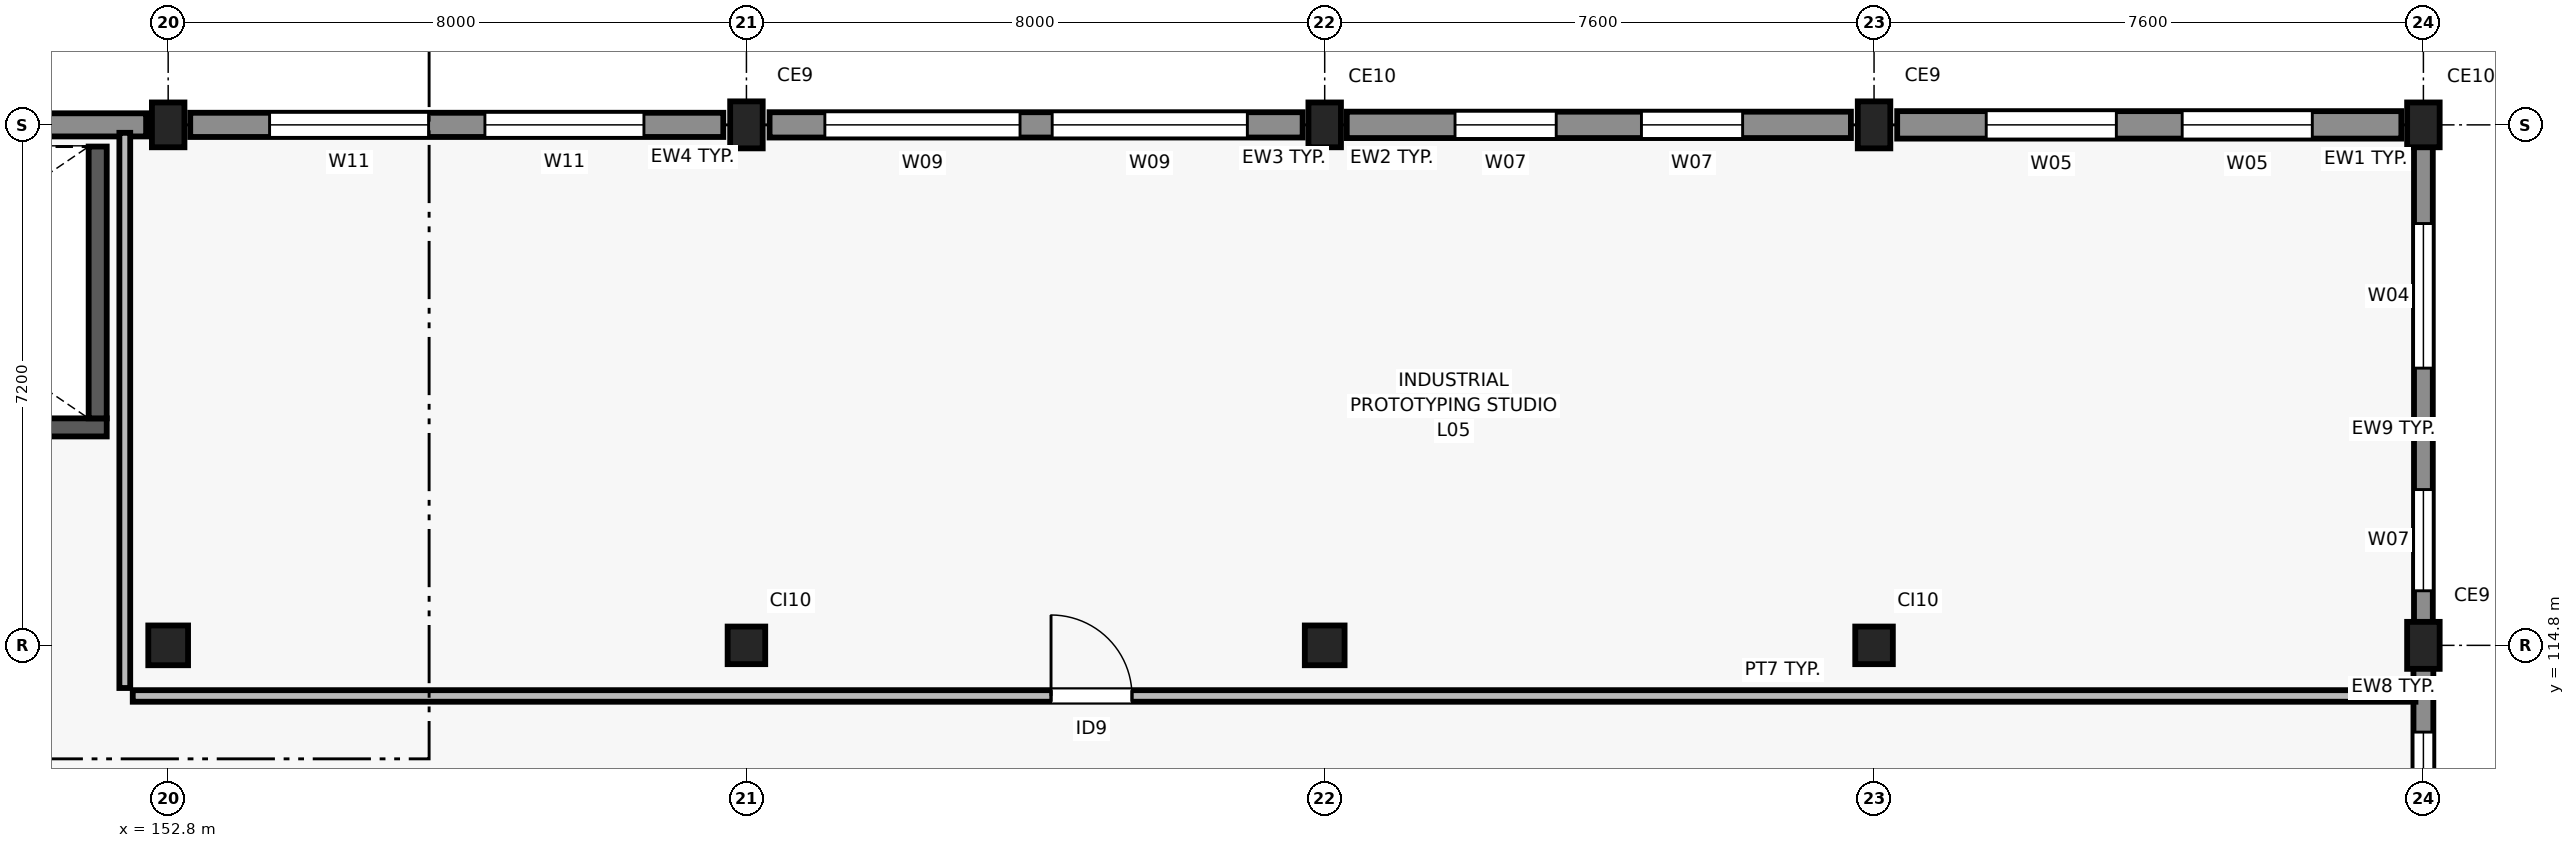
"""IFC4 building model, lengths in metres.
Left out: names, types, materials, properties, quantities, classifications, styles, units other than length and angle.
Written with IfcOpenShell. Run it as: python <this file> out.ifc"""

import sys

from ifc_helpers import new_model, si_unit, direction, frame, frame_2d, origin, origin_2d, place, context, subcontext, project, spatial, rectangle, extrude, element, fill, save


model = new_model("IFC4")
c1 = context("Model", 3, precision=1e-05, world=origin(), true_north=direction((0.0, 1.0)))
c2 = subcontext(c1, "Body", "Model", "MODEL_VIEW")
j1 = project(units=[si_unit("LENGTHUNIT", "METRE"), si_unit("PLANEANGLEUNIT", "RADIAN")], contexts=[c1])
p1 = place(None, origin())
s1 = spatial("IfcSite", under=j1, at=p1, CompositionType="ELEMENT")
p2 = place(p1, origin())
s2 = spatial("IfcBuilding", under=s1, at=p2, CompositionType="ELEMENT")
p3 = place(p2, frame((0.0, 0.0, 21.6)))
s3 = spatial("IfcBuildingStorey", under=s2, at=p3, CompositionType="ELEMENT", Elevation=21.6)
p4 = place(p3, frame((152.8, 114.8, 0.0), z_axis=(0.0, 0.0, 1.0), x_axis=(1.0, 0.0, 0.0)))
e1 = element("IfcColumn", 1, at=p4, inside=s3, PredefinedType="COLUMN", context=c2, shape_type="SweptSolid", body=[
    extrude(rectangle(XDim=0.55, YDim=0.55, at=origin_2d()), origin(), (0.0, 0.0, 1.0), 4.2),
])
p5 = place(p3, frame((152.8, 122.0, 0.0), z_axis=(0.0, 0.0, 1.0), x_axis=(1.0, 0.0, 0.0)))
e2 = element("IfcColumn", 2, at=p5, inside=s3, PredefinedType="COLUMN", context=c2, shape_type="SweptSolid", body=[
    extrude(rectangle(XDim=0.62, YDim=0.45, at=origin_2d()), origin(), (0.0, 0.0, 1.0), 4.2),
])
p6 = place(p3, frame((160.8, 114.8, 0.0), z_axis=(0.0, 0.0, 1.0), x_axis=(1.0, 0.0, 0.0)))
e3 = element("IfcColumn", 3, at=p6, inside=s3, PredefinedType="COLUMN", context=c2, shape_type="SweptSolid", body=[
    extrude(rectangle(XDim=0.52, YDim=0.52, at=origin_2d()), origin(), (0.0, 0.0, 1.0), 4.2),
])
p7 = place(p3, frame((160.8, 122.0, 0.0), z_axis=(0.0, 0.0, 1.0), x_axis=(1.0, 0.0, 0.0)))
e4 = element("IfcColumn", 4, at=p7, inside=s3, PredefinedType="COLUMN", context=c2, shape_type="SweptSolid", body=[
    extrude(rectangle(XDim=0.65, YDim=0.45, at=origin_2d()), origin(), (0.0, 0.0, 1.0), 4.2),
])
p8 = place(p3, frame((168.8, 114.8, 0.0), z_axis=(0.0, 0.0, 1.0), x_axis=(1.0, 0.0, 0.0)))
e5 = element("IfcColumn", 5, at=p8, inside=s3, PredefinedType="COLUMN", context=c2, shape_type="SweptSolid", body=[
    extrude(rectangle(XDim=0.55, YDim=0.55, at=origin_2d()), origin(), (0.0, 0.0, 1.0), 4.2),
])
p9 = place(p3, frame((168.8, 122.0, 0.0), z_axis=(0.0, 0.0, 1.0), x_axis=(1.0, 0.0, 0.0)))
e6 = element("IfcColumn", 6, at=p9, inside=s3, PredefinedType="COLUMN", context=c2, shape_type="SweptSolid", body=[
    extrude(rectangle(XDim=0.62, YDim=0.45, at=origin_2d()), origin(), (0.0, 0.0, 1.0), 4.2),
])
p10 = place(p3, frame((176.4, 114.8, 0.0), z_axis=(0.0, 0.0, 1.0), x_axis=(1.0, 0.0, 0.0)))
e7 = element("IfcColumn", 7, at=p10, inside=s3, PredefinedType="COLUMN", context=c2, shape_type="SweptSolid", body=[
    extrude(rectangle(XDim=0.52, YDim=0.52, at=origin_2d()), origin(), (0.0, 0.0, 1.0), 4.2),
])
for number, where, z_axis, x_axis in (
    (8, (176.4, 122.0, 0.0), (0.0, 0.0, 1.0), (1.0, 0.0, 0.0)),
    (9, (184.0, 114.8, 0.0), (0.0, 0.0, 1.0), (1.0, 0.0, 0.0)),
):
    element("IfcColumn", number, at=place(p3, frame(where, z_axis=z_axis, x_axis=x_axis)), inside=s3, PredefinedType="COLUMN", context=c2, shape_type="SweptSolid", body=[
        extrude(rectangle(XDim=0.65, YDim=0.45, at=origin_2d()), origin(), (0.0, 0.0, 1.0), 4.2),
    ])
p11 = place(p3, frame((184.0, 122.0, 0.0), z_axis=(0.0, 0.0, 1.0), x_axis=(1.0, 0.0, 0.0)))
e10 = element("IfcColumn", 10, at=p11, inside=s3, PredefinedType="COLUMN", context=c2, shape_type="SweptSolid", body=[
    extrude(rectangle(XDim=0.62, YDim=0.45, at=origin_2d()), origin(), (0.0, 0.0, 1.0), 4.2),
])
p12 = place(p3, frame((184.0, 107.82, 0.0), z_axis=(0.0, 0.0, 1.0), x_axis=(0.0, 1.0, 0.0)))
e11 = element("IfcWall", 11, at=p12, inside=s3, PredefinedType="SOLIDWALL", context=c2, shape_type="SweptSolid", body=[
    extrude(rectangle(XDim=6.76, YDim=0.275, at=frame_2d((3.38, 0.0))), origin(), (0.0, 0.0, 1.0), 3.52),
])
p13 = place(p12, frame((0.39, 0.0, 0.9)))
e12 = element("IfcOpeningElement", 12, at=p13, cuts=e11, PredefinedType="OPENING", context=c2, shape_type="SweptSolid", body=[
    extrude(rectangle(XDim=2.7, YDim=1.8, at=frame_2d((1.35, 0.9))), frame((0.0, 0.147, 0.0), z_axis=(0.0, -1.0, 0.0), x_axis=(1.0, 0.0, 0.0)), (0.0, 0.0, 1.0), 0.295),
])
p14 = place(p12, frame((3.98, 0.0, 0.9)))
e13 = element("IfcOpeningElement", 13, at=p14, cuts=e11, PredefinedType="OPENING", context=c2, shape_type="SweptSolid", body=[
    extrude(rectangle(XDim=1.8, YDim=1.8, at=frame_2d((0.9, 0.9))), frame((0.0, 0.147, 0.0), z_axis=(0.0, -1.0, 0.0), x_axis=(1.0, 0.0, 0.0)), (0.0, 0.0, 1.0), 0.295),
])
p15 = place(p3, frame((184.0, 115.02, 0.0), z_axis=(0.0, 0.0, 1.0), x_axis=(0.0, 1.0, 0.0)))
e14 = element("IfcWall", 14, at=p15, inside=s3, PredefinedType="SOLIDWALL", context=c2, shape_type="SweptSolid", body=[
    extrude(rectangle(XDim=6.76, YDim=0.26, at=frame_2d((3.38, 0.0))), origin(), (0.0, 0.0, 1.0), 3.54),
])
p16 = place(p15, frame((0.535, 0.0, 0.9)))
e15 = element("IfcOpeningElement", 15, at=p16, cuts=e14, PredefinedType="OPENING", context=c2, shape_type="SweptSolid", body=[
    extrude(rectangle(XDim=1.4, YDim=1.8, at=frame_2d((0.7, 0.9))), frame((0.0, 0.14, 0.0), z_axis=(0.0, -1.0, 0.0), x_axis=(1.0, 0.0, 0.0)), (0.0, 0.0, 1.0), 0.28),
])
p17 = place(p15, frame((3.615, 0.0, 0.9)))
e16 = element("IfcOpeningElement", 16, at=p17, cuts=e14, PredefinedType="OPENING", context=c2, shape_type="SweptSolid", body=[
    extrude(rectangle(XDim=2.0, YDim=1.8, at=frame_2d((1.0, 0.9))), frame((0.0, 0.14, 0.0), z_axis=(0.0, -1.0, 0.0), x_axis=(1.0, 0.0, 0.0)), (0.0, 0.0, 1.0), 0.28),
])
p18 = place(p3, frame((183.695, 122.0, 0.0), z_axis=(0.0, 0.0, 1.0), x_axis=(-1.0, 0.0, 0.0)))
e17 = element("IfcWall", 17, at=p18, inside=s3, PredefinedType="SOLIDWALL", context=c2, shape_type="SweptSolid", body=[
    extrude(rectangle(XDim=6.975, YDim=0.38, at=frame_2d((3.488, 0.0))), origin(), (0.0, 0.0, 1.0), 3.43),
])
p19 = place(p18, frame((1.232, 0.0, 0.9)))
e18 = element("IfcOpeningElement", 18, at=p19, cuts=e17, PredefinedType="OPENING", context=c2, shape_type="SweptSolid", body=[
    extrude(rectangle(XDim=1.8, YDim=1.8, at=frame_2d((0.9, 0.9))), frame((0.0, 0.2, 0.0), z_axis=(0.0, -1.0, 0.0), x_axis=(1.0, 0.0, 0.0)), (0.0, 0.0, 1.0), 0.4),
])
p20 = place(p18, frame((3.943, 0.0, 0.9)))
e19 = element("IfcOpeningElement", 19, at=p20, cuts=e17, PredefinedType="OPENING", context=c2, shape_type="SweptSolid", body=[
    extrude(rectangle(XDim=1.8, YDim=1.8, at=frame_2d((0.9, 0.9))), frame((0.0, 0.2, 0.0), z_axis=(0.0, -1.0, 0.0), x_axis=(1.0, 0.0, 0.0)), (0.0, 0.0, 1.0), 0.4),
])
p21 = place(p3, frame((176.08, 122.0, 0.0), z_axis=(0.0, 0.0, 1.0), x_axis=(-1.0, 0.0, 0.0)))
e20 = element("IfcWall", 20, at=p21, inside=s3, PredefinedType="SOLIDWALL", context=c2, shape_type="SweptSolid", body=[
    extrude(rectangle(XDim=6.975, YDim=0.365, at=frame_2d((3.488, 0.0))), origin(), (0.0, 0.0, 1.0), 3.43),
])
p22 = place(p21, frame((1.498, 0.0, 0.9)))
e21 = element("IfcOpeningElement", 21, at=p22, cuts=e20, PredefinedType="OPENING", context=c2, shape_type="SweptSolid", body=[
    extrude(rectangle(XDim=1.4, YDim=1.8, at=frame_2d((0.7, 0.9))), frame((0.0, 0.192, 0.0), z_axis=(0.0, -1.0, 0.0), x_axis=(1.0, 0.0, 0.0)), (0.0, 0.0, 1.0), 0.385),
])
p23 = place(p21, frame((4.077, 0.0, 0.9)))
e22 = element("IfcOpeningElement", 22, at=p23, cuts=e20, PredefinedType="OPENING", context=c2, shape_type="SweptSolid", body=[
    extrude(rectangle(XDim=1.4, YDim=1.8, at=frame_2d((0.7, 0.9))), frame((0.0, 0.192, 0.0), z_axis=(0.0, -1.0, 0.0), x_axis=(1.0, 0.0, 0.0)), (0.0, 0.0, 1.0), 0.385),
])
p24 = place(p3, frame((168.495, 122.0, 0.0), z_axis=(0.0, 0.0, 1.0), x_axis=(-1.0, 0.0, 0.0)))
e23 = element("IfcWall", 23, at=p24, inside=s3, PredefinedType="SOLIDWALL", context=c2, shape_type="SweptSolid", body=[
    extrude(rectangle(XDim=7.375, YDim=0.35, at=frame_2d((3.688, 0.0))), origin(), (0.0, 0.0, 1.0), 3.33),
])
p25 = place(p24, frame((0.765, 0.0, 0.9)))
e24 = element("IfcOpeningElement", 24, at=p25, cuts=e23, PredefinedType="OPENING", context=c2, shape_type="SweptSolid", body=[
    extrude(rectangle(XDim=2.7, YDim=1.5, at=frame_2d((1.35, 0.75))), frame((0.0, 0.185, 0.0), z_axis=(0.0, -1.0, 0.0), x_axis=(1.0, 0.0, 0.0)), (0.0, 0.0, 1.0), 0.37),
])
p26 = place(p24, frame((3.91, 0.0, 0.9)))
e25 = element("IfcOpeningElement", 25, at=p26, cuts=e23, PredefinedType="OPENING", context=c2, shape_type="SweptSolid", body=[
    extrude(rectangle(XDim=2.7, YDim=1.5, at=frame_2d((1.35, 0.75))), frame((0.0, 0.185, 0.0), z_axis=(0.0, -1.0, 0.0), x_axis=(1.0, 0.0, 0.0)), (0.0, 0.0, 1.0), 0.37),
])
p27 = place(p3, frame((160.48, 122.0, 0.0), z_axis=(0.0, 0.0, 1.0), x_axis=(-1.0, 0.0, 0.0)))
e26 = element("IfcWall", 26, at=p27, inside=s3, PredefinedType="SOLIDWALL", context=c2, shape_type="SweptSolid", body=[
    extrude(rectangle(XDim=7.375, YDim=0.335, at=frame_2d((3.688, 0.0))), origin(), (0.0, 0.0, 1.0), 3.43),
])
p28 = place(p27, frame((1.098, 0.0, 0.9)))
e27 = element("IfcOpeningElement", 27, at=p28, cuts=e26, PredefinedType="OPENING", context=c2, shape_type="SweptSolid", body=[
    extrude(rectangle(XDim=2.2, YDim=1.5, at=frame_2d((1.1, 0.75))), frame((0.0, 0.177, 0.0), z_axis=(0.0, -1.0, 0.0), x_axis=(1.0, 0.0, 0.0)), (0.0, 0.0, 1.0), 0.355),
])
p29 = place(p27, frame((4.077, 0.0, 0.9)))
e28 = element("IfcOpeningElement", 28, at=p29, cuts=e26, PredefinedType="OPENING", context=c2, shape_type="SweptSolid", body=[
    extrude(rectangle(XDim=2.2, YDim=1.5, at=frame_2d((1.1, 0.75))), frame((0.0, 0.177, 0.0), z_axis=(0.0, -1.0, 0.0), x_axis=(1.0, 0.0, 0.0)), (0.0, 0.0, 1.0), 0.355),
])
p30 = place(p3, frame((152.495, 122.0, 0.0), z_axis=(0.0, 0.0, 1.0), x_axis=(-1.0, 0.0, 0.0)))
e29 = element("IfcWall", 29, at=p30, inside=s3, PredefinedType="SOLIDWALL", context=c2, shape_type="SweptSolid", body=[
    extrude(rectangle(XDim=7.375, YDim=0.32, at=frame_2d((3.688, 0.0))), origin(), (0.0, 0.0, 1.0), 3.92),
])
p31 = place(p3, frame((144.05, 117.815, 0.0), z_axis=(0.0, 0.0, 1.0), x_axis=(1.0, 0.0, 0.0)))
e30 = element("IfcWall", 30, at=p31, inside=s3, PredefinedType="SHEAR", context=c2, shape_type="SweptSolid", body=[
    extrude(rectangle(XDim=7.9, YDim=0.25, at=frame_2d((3.95, 0.0))), origin(), (0.0, 0.0, 1.0), 3.92),
])
p32 = place(p31, frame((0.5, 0.0, 0.0)))
e31 = element("IfcOpeningElement", 31, at=p32, cuts=e30, PredefinedType="OPENING", context=c2, shape_type="SweptSolid", body=[
    extrude(rectangle(XDim=1.25, YDim=2.2, at=frame_2d((0.625, 1.1))), frame((0.0, 0.135, 0.0), z_axis=(0.0, -1.0, 0.0), x_axis=(1.0, 0.0, 0.0)), (0.0, 0.0, 1.0), 0.27),
])
p33 = place(p3, frame((151.825, 117.94, 0.0), z_axis=(0.0, 0.0, 1.0), x_axis=(0.0, 1.0, 0.0)))
e32 = element("IfcWall", 32, at=p33, inside=s3, PredefinedType="SHEAR", context=c2, shape_type="SweptSolid", body=[
    extrude(rectangle(XDim=3.76, YDim=0.25, at=frame_2d((1.88, 0.0))), origin(), (0.0, 0.0, 1.0), 3.92),
])
p34 = place(p3, frame((152.31, 114.1, 0.0), z_axis=(0.0, 0.0, 1.0), x_axis=(1.0, 0.0, 0.0)))
e33 = element("IfcWall", 33, at=p34, inside=s3, PredefinedType="PARTITIONING", context=c2, shape_type="SweptSolid", body=[
    extrude(rectangle(XDim=31.58, YDim=0.16, at=frame_2d((15.79, 0.0))), origin(), (0.0, 0.0, 1.0), 3.9),
])
p35 = place(p34, frame((12.704, 0.0, 0.0)))
e34 = element("IfcOpeningElement", 34, at=p35, cuts=e33, PredefinedType="OPENING", context=c2, shape_type="SweptSolid", body=[
    extrude(rectangle(XDim=1.12, YDim=2.2, at=frame_2d((0.56, 1.1))), frame((0.0, 0.09, 0.0), z_axis=(0.0, -1.0, 0.0), x_axis=(1.0, 0.0, 0.0)), (0.0, 0.0, 1.0), 0.18),
])
p36 = place(p3, frame((152.2, 114.21, 0.0), z_axis=(0.0, 0.0, 1.0), x_axis=(0.0, 1.0, 0.0)))
e35 = element("IfcWall", 35, at=p36, inside=s3, PredefinedType="PARTITIONING", context=c2, shape_type="SweptSolid", body=[
    extrude(rectangle(XDim=7.68, YDim=0.15, at=frame_2d((3.84, 0.0))), origin(), (0.0, 0.0, 1.0), 3.9),
])
p37 = place(p14, origin())
e36 = element("IfcWindow", 36, at=p37, inside=s3, PartitioningType="SINGLE_PANEL", PredefinedType="WINDOW", context=c2, shape_type="SweptSolid", body=[
    extrude(rectangle(XDim=1.8, YDim=1.8, at=frame_2d((0.9, 0.9))), frame((0.0, 0.03, 0.0), z_axis=(0.0, -1.0, 0.0), x_axis=(1.0, 0.0, 0.0)), (0.0, 0.0, 1.0), 0.06),
])
fill(e13, e36)
p38 = place(p16, origin())
e37 = element("IfcWindow", 37, at=p38, inside=s3, PartitioningType="SINGLE_PANEL", PredefinedType="WINDOW", context=c2, shape_type="SweptSolid", body=[
    extrude(rectangle(XDim=1.4, YDim=1.8, at=frame_2d((0.7, 0.9))), frame((0.0, 0.03, 0.0), z_axis=(0.0, -1.0, 0.0), x_axis=(1.0, 0.0, 0.0)), (0.0, 0.0, 1.0), 0.06),
])
fill(e15, e37)
p39 = place(p17, origin())
e38 = element("IfcWindow", 38, at=p39, inside=s3, PartitioningType="SINGLE_PANEL", PredefinedType="WINDOW", context=c2, shape_type="SweptSolid", body=[
    extrude(rectangle(XDim=2.0, YDim=1.8, at=frame_2d((1.0, 0.9))), frame((0.0, 0.03, 0.0), z_axis=(0.0, -1.0, 0.0), x_axis=(1.0, 0.0, 0.0)), (0.0, 0.0, 1.0), 0.06),
])
fill(e16, e38)
p40 = place(p19, origin())
e39 = element("IfcWindow", 39, at=p40, inside=s3, PartitioningType="SINGLE_PANEL", PredefinedType="WINDOW", context=c2, shape_type="SweptSolid", body=[
    extrude(rectangle(XDim=1.8, YDim=1.8, at=frame_2d((0.9, 0.9))), frame((0.0, 0.03, 0.0), z_axis=(0.0, -1.0, 0.0), x_axis=(1.0, 0.0, 0.0)), (0.0, 0.0, 1.0), 0.06),
])
fill(e18, e39)
p41 = place(p20, origin())
e40 = element("IfcWindow", 40, at=p41, inside=s3, PartitioningType="SINGLE_PANEL", PredefinedType="WINDOW", context=c2, shape_type="SweptSolid", body=[
    extrude(rectangle(XDim=1.8, YDim=1.8, at=frame_2d((0.9, 0.9))), frame((0.0, 0.03, 0.0), z_axis=(0.0, -1.0, 0.0), x_axis=(1.0, 0.0, 0.0)), (0.0, 0.0, 1.0), 0.06),
])
fill(e19, e40)
p42 = place(p22, origin())
e41 = element("IfcWindow", 41, at=p42, inside=s3, PartitioningType="SINGLE_PANEL", PredefinedType="WINDOW", context=c2, shape_type="SweptSolid", body=[
    extrude(rectangle(XDim=1.4, YDim=1.8, at=frame_2d((0.7, 0.9))), frame((0.0, 0.03, 0.0), z_axis=(0.0, -1.0, 0.0), x_axis=(1.0, 0.0, 0.0)), (0.0, 0.0, 1.0), 0.06),
])
fill(e21, e41)
p43 = place(p23, origin())
e42 = element("IfcWindow", 42, at=p43, inside=s3, PartitioningType="SINGLE_PANEL", PredefinedType="WINDOW", context=c2, shape_type="SweptSolid", body=[
    extrude(rectangle(XDim=1.4, YDim=1.8, at=frame_2d((0.7, 0.9))), frame((0.0, 0.03, 0.0), z_axis=(0.0, -1.0, 0.0), x_axis=(1.0, 0.0, 0.0)), (0.0, 0.0, 1.0), 0.06),
])
fill(e22, e42)
p44 = place(p25, origin())
e43 = element("IfcWindow", 43, at=p44, inside=s3, PartitioningType="SINGLE_PANEL", PredefinedType="WINDOW", context=c2, shape_type="SweptSolid", body=[
    extrude(rectangle(XDim=2.7, YDim=1.5, at=frame_2d((1.35, 0.75))), frame((0.0, 0.03, 0.0), z_axis=(0.0, -1.0, 0.0), x_axis=(1.0, 0.0, 0.0)), (0.0, 0.0, 1.0), 0.06),
])
fill(e24, e43)
p45 = place(p26, origin())
e44 = element("IfcWindow", 44, at=p45, inside=s3, PartitioningType="SINGLE_PANEL", PredefinedType="WINDOW", context=c2, shape_type="SweptSolid", body=[
    extrude(rectangle(XDim=2.7, YDim=1.5, at=frame_2d((1.35, 0.75))), frame((0.0, 0.03, 0.0), z_axis=(0.0, -1.0, 0.0), x_axis=(1.0, 0.0, 0.0)), (0.0, 0.0, 1.0), 0.06),
])
fill(e25, e44)
p46 = place(p28, origin())
e45 = element("IfcWindow", 45, at=p46, inside=s3, PartitioningType="SINGLE_PANEL", PredefinedType="WINDOW", context=c2, shape_type="SweptSolid", body=[
    extrude(rectangle(XDim=2.2, YDim=1.5, at=frame_2d((1.1, 0.75))), frame((0.0, 0.03, 0.0), z_axis=(0.0, -1.0, 0.0), x_axis=(1.0, 0.0, 0.0)), (0.0, 0.0, 1.0), 0.06),
])
fill(e27, e45)
p47 = place(p29, origin())
e46 = element("IfcWindow", 46, at=p47, inside=s3, PartitioningType="SINGLE_PANEL", PredefinedType="WINDOW", context=c2, shape_type="SweptSolid", body=[
    extrude(rectangle(XDim=2.2, YDim=1.5, at=frame_2d((1.1, 0.75))), frame((0.0, 0.03, 0.0), z_axis=(0.0, -1.0, 0.0), x_axis=(1.0, 0.0, 0.0)), (0.0, 0.0, 1.0), 0.06),
])
fill(e28, e46)
p48 = place(p35, origin())
e47 = element("IfcDoor", 47, at=p48, inside=s3, OperationType="SINGLE_SWING_LEFT", PredefinedType="DOOR", context=c2, shape_type="SweptSolid", body=[
    extrude(rectangle(XDim=1.12, YDim=2.2, at=frame_2d((0.56, 1.1))), frame((0.0, 0.025, 0.0), z_axis=(0.0, -1.0, 0.0), x_axis=(1.0, 0.0, 0.0)), (0.0, 0.0, 1.0), 0.05),
])
fill(e34, e47)
save(model, sys.argv[1])
